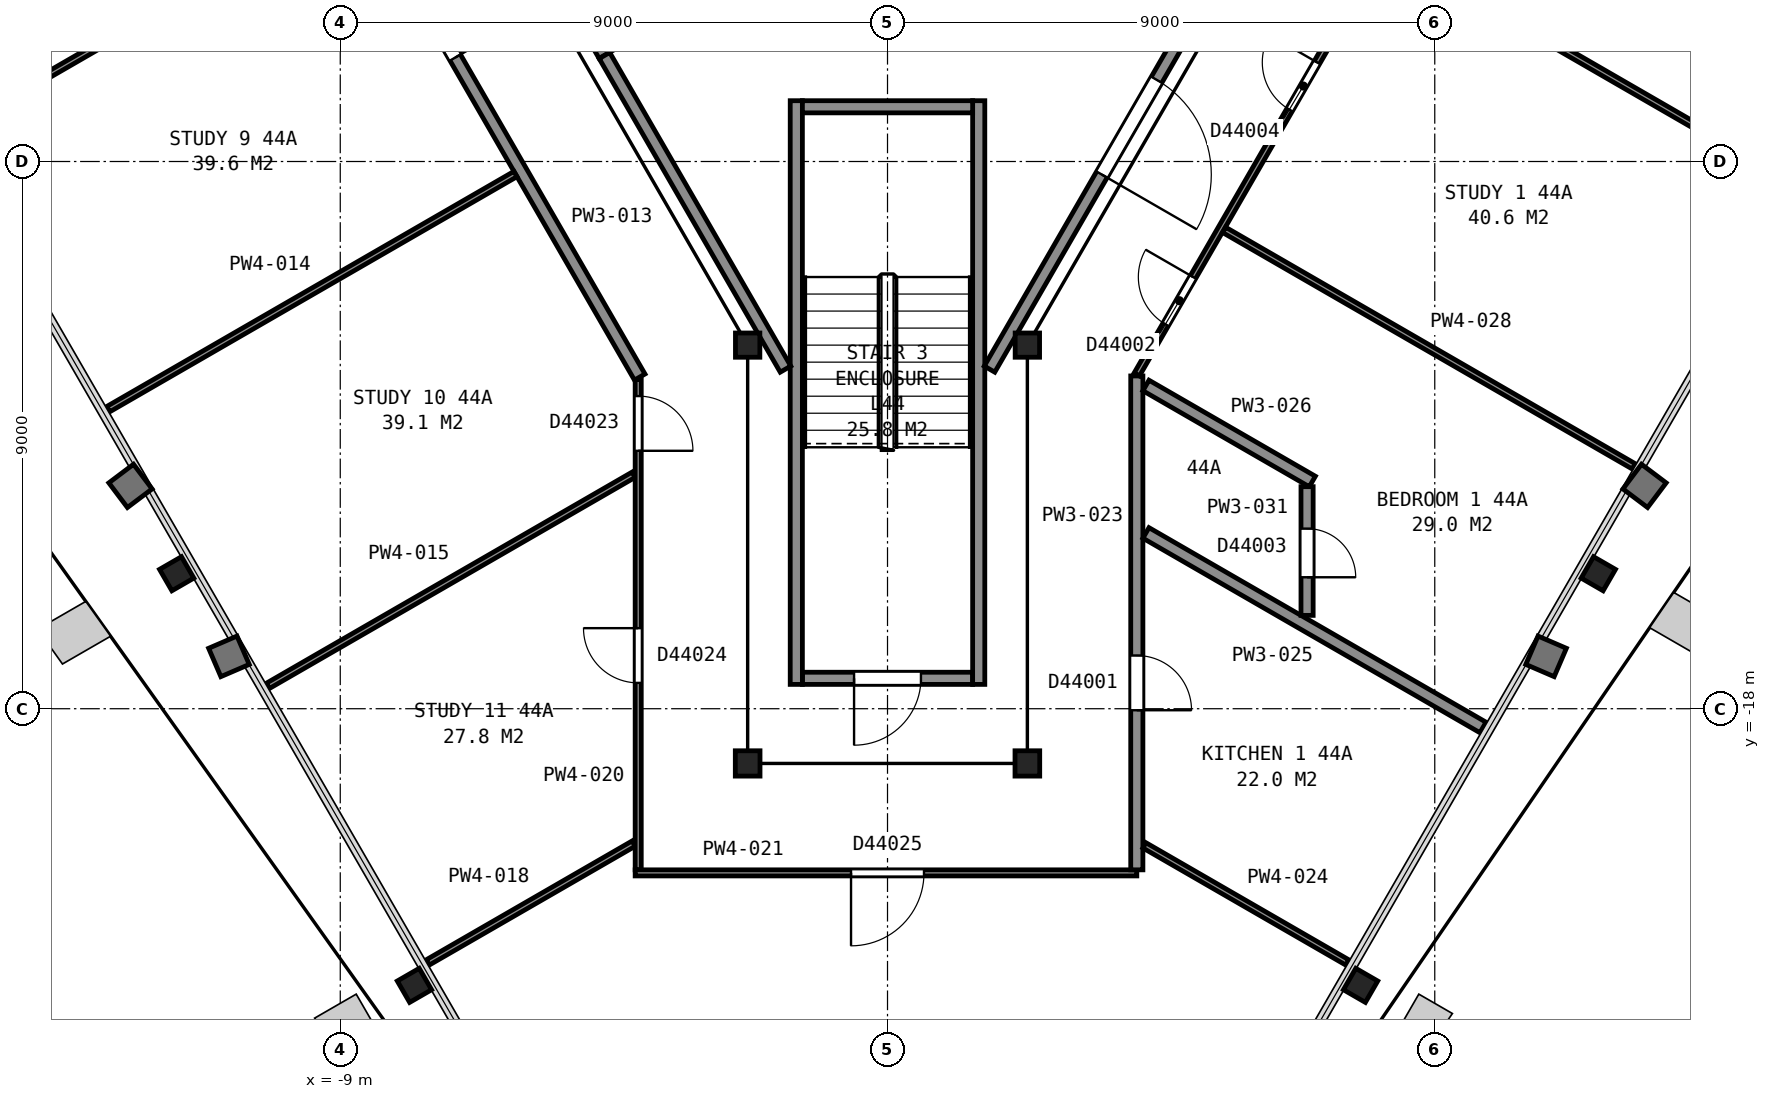
"""IFC4 building model, lengths in metres.
Left out: names, types, materials, properties, quantities, classifications, styles, units other than length and angle.
Written with IfcOpenShell. Run it as: python <this file> out.ifc"""

import sys

from ifc_helpers import new_model, si_unit, direction, frame, frame_2d, origin, origin_2d, place, context, subcontext, project, spatial, rectangle, i_section, extrude, element, fill, save


model = new_model("IFC4")
c1 = context("Model", 3, precision=1e-05, world=origin(), true_north=direction((0.0, 1.0)))
c2 = subcontext(c1, "Body", "Model", "MODEL_VIEW")
j1 = project(units=[si_unit("LENGTHUNIT", "METRE"), si_unit("PLANEANGLEUNIT", "RADIAN")], contexts=[c1])
p1 = place(None, origin())
s1 = spatial("IfcSite", under=j1, at=p1, CompositionType="ELEMENT")
p2 = place(p1, origin())
s2 = spatial("IfcBuilding", under=s1, at=p2, CompositionType="ELEMENT")
p3 = place(p2, frame((0.0, 0.0, 178.4)))
s3 = spatial("IfcBuildingStorey", under=s2, at=p3, CompositionType="ELEMENT", Elevation=178.4)
p4 = place(p3, frame((-11.69, -15.78, 0.035), z_axis=(0.0, 0.0, 1.0), x_axis=(-0.5, 0.866025403784, 0.0)))
e1 = element("IfcColumn", 1, at=p4, inside=s3, PredefinedType="COLUMN", context=c2, shape_type="SweptSolid", body=[
    extrude(i_section(OverallWidth=0.406, OverallDepth=0.417, WebThickness=0.03, FlangeThickness=0.048, FilletRadius=0.015, at=origin_2d()), origin(), (0.0, 0.0, 1.0), 3.665),
])
for number, where, z_axis, x_axis in (
    (2, (-7.78, -22.55, 0.04), (0.0, 0.0, 1.0), (-0.5, 0.866, 0.0)),
    (3, (7.78, -22.55, 0.04), (0.0, 0.0, 1.0), (-0.5, -0.866, 0.0)),
):
    element("IfcColumn", number, at=place(p3, frame(where, z_axis=z_axis, x_axis=x_axis)), inside=s3, PredefinedType="COLUMN", context=c2, shape_type="SweptSolid", body=[
        extrude(i_section(OverallWidth=0.406, OverallDepth=0.417, WebThickness=0.03, FlangeThickness=0.048, FilletRadius=0.015, at=origin_2d()), origin(), (0.0, 0.0, 1.0), 3.66),
    ])
p5 = place(p3, frame((11.69, -15.78, 0.035), z_axis=(0.0, 0.0, 1.0), x_axis=(-0.5, -0.866025403784, 0.0)))
e4 = element("IfcColumn", 4, at=p5, inside=s3, PredefinedType="COLUMN", context=c2, shape_type="SweptSolid", body=[
    extrude(i_section(OverallWidth=0.406, OverallDepth=0.417, WebThickness=0.03, FlangeThickness=0.048, FilletRadius=0.015, at=origin_2d()), origin(), (0.0, 0.0, 1.0), 3.665),
])
p6 = place(p3, frame((-2.3, -12.02, 0.0), z_axis=(0.0, 0.0, 1.0), x_axis=(1.0, 0.0, 0.0)))
e5 = element("IfcColumn", 5, at=p6, inside=s3, PredefinedType="COLUMN", context=c2, shape_type="SweptSolid", body=[
    extrude(i_section(OverallWidth=0.401, OverallDepth=0.399, WebThickness=0.025, FlangeThickness=0.04, FilletRadius=0.015, at=origin_2d()), origin(), (0.0, 0.0, 1.0), 3.7),
])
for number, where, z_axis, x_axis in (
    (6, (-2.3, -18.9, 0.0), (0.0, 0.0, 1.0), (-1.0, 0.0, 0.0)),
    (7, (2.3, -18.9, 0.0), (0.0, 0.0, 1.0), (-1.0, 0.0, 0.0)),
):
    element("IfcColumn", number, at=place(p3, frame(where, z_axis=z_axis, x_axis=x_axis)), inside=s3, PredefinedType="COLUMN", context=c2, shape_type="SweptSolid", body=[
        extrude(i_section(OverallWidth=0.406, OverallDepth=0.417, WebThickness=0.03, FlangeThickness=0.048, FilletRadius=0.015, at=origin_2d()), origin(), (0.0, 0.0, 1.0), 3.7),
    ])
p7 = place(p3, frame((2.3, -12.02, 0.0), z_axis=(0.0, 0.0, 1.0), x_axis=(1.0, 0.0, 0.0)))
e8 = element("IfcColumn", 8, at=p7, inside=s3, PredefinedType="COLUMN", context=c2, shape_type="SweptSolid", body=[
    extrude(i_section(OverallWidth=0.401, OverallDepth=0.399, WebThickness=0.025, FlangeThickness=0.04, FilletRadius=0.015, at=origin_2d()), origin(), (0.0, 0.0, 1.0), 3.7),
])
p8 = place(p3, frame((-1.4, -17.5, 0.0), z_axis=(0.0, 0.0, 1.0), x_axis=(1.0, 0.0, 0.0)))
e9 = element("IfcWall", 9, at=p8, inside=s3, PredefinedType="PARTITIONING", context=c2, shape_type="SweptSolid", body=[
    extrude(rectangle(XDim=2.8, YDim=0.2, at=frame_2d((1.4, 0.0))), origin(), (0.0, 0.0, 1.0), 3.45),
])
p9 = place(p8, frame((0.85, 0.0, 0.0)))
e10 = element("IfcOpeningElement", 10, at=p9, cuts=e9, PredefinedType="OPENING", context=c2, shape_type="SweptSolid", body=[
    extrude(rectangle(XDim=1.1, YDim=2.1, at=frame_2d((0.55, 1.05))), frame((0.0, 0.11, 0.0), z_axis=(0.0, -1.0, 0.0), x_axis=(1.0, 0.0, 0.0)), (0.0, 0.0, 1.0), 0.22),
])
for number, where, z_axis, x_axis in (
    (11, (1.5, -8.0, 0.0), (0.0, 0.0, 1.0), (0.0, -1.0, 0.0)),
    (12, (-1.5, -8.0, 0.0), (0.0, 0.0, 1.0), (0.0, -1.0, 0.0)),
):
    element("IfcWall", number, at=place(p3, frame(where, z_axis=z_axis, x_axis=x_axis)), inside=s3, PredefinedType="PARTITIONING", context=c2, shape_type="SweptSolid", body=[
        extrude(rectangle(XDim=9.6, YDim=0.2, at=frame_2d((4.8, 0.0))), origin(), (0.0, 0.0, 1.0), 3.45),
    ])
p10 = place(p3, frame((-1.4, -8.1, 0.0), z_axis=(0.0, 0.0, 1.0), x_axis=(1.0, 0.0, 0.0)))
e13 = element("IfcWall", 13, at=p10, inside=s3, PredefinedType="PARTITIONING", context=c2, shape_type="SweptSolid", body=[
    extrude(rectangle(XDim=2.8, YDim=0.2, at=frame_2d((1.4, 0.0))), origin(), (0.0, 0.0, 1.0), 3.45),
])
p11 = place(p3, frame((-4.62, -7.118, 0.0), z_axis=(0.0, 0.0, 1.0), x_axis=(0.866036909293, 0.499980071345, 0.0)))
e14 = element("IfcWall", 14, at=p11, inside=s3, PredefinedType="PARTITIONING", context=c2, shape_type="SweptSolid", body=[
    extrude(rectangle(XDim=1.75, YDim=0.2, at=frame_2d((0.875, 0.0))), origin(), (0.0, 0.0, 1.0), 3.7),
])
p12 = place(p3, frame((-4.656, -7.255, 0.0), z_axis=(0.0, 0.0, 1.0), x_axis=(-0.499990435942, 0.866030925526, 0.0)))
e15 = element("IfcWall", 15, at=p12, inside=s3, PredefinedType="PARTITIONING", context=c2, shape_type="SweptSolid", body=[
    extrude(rectangle(XDim=2.55, YDim=0.2, at=frame_2d((1.275, 0.0))), origin(), (0.0, 0.0, 1.0), 3.7),
])
p13 = place(p3, frame((-4.655, -7.257, 0.0), z_axis=(0.0, 0.0, 1.0), x_axis=(0.499966124405, -0.866044960985, 0.0)))
e16 = element("IfcWall", 16, at=p13, inside=s3, PredefinedType="PARTITIONING", context=c2, shape_type="SweptSolid", body=[
    extrude(rectangle(XDim=5.956, YDim=0.2, at=frame_2d((2.978, 0.0))), origin(), (0.0, 0.0, 1.0), 3.45),
])
p14 = place(p3, frame((1.677, -12.415, 0.0), z_axis=(0.0, 0.0, 1.0), x_axis=(0.500054337157, 0.865994029939, 0.0)))
e17 = element("IfcWall", 17, at=p14, inside=s3, PredefinedType="PARTITIONING", context=c2, shape_type="SweptSolid", body=[
    extrude(rectangle(XDim=6.177, YDim=0.2, at=frame_2d((3.088, 0.0))), origin(), (0.0, 0.0, 1.0), 3.45),
])
p15 = place(p14, frame((3.695, 0.0, 0.0)))
e18 = element("IfcOpeningElement", 18, at=p15, cuts=e17, PredefinedType="OPENING", context=c2, shape_type="SweptSolid", body=[
    extrude(rectangle(XDim=1.8, YDim=2.1, at=frame_2d((0.9, 1.05))), frame((0.0, 0.11, 0.0), z_axis=(0.0, -1.0, 0.0), x_axis=(1.0, 0.0, 0.0)), (0.0, 0.0, 1.0), 0.22),
])
p16 = place(p3, frame((-15.442, -8.523, 0.0), z_axis=(0.0, 0.0, 1.0), x_axis=(0.866007875589, 0.500030358497, 0.0)))
e19 = element("IfcWall", 19, at=p16, inside=s3, PredefinedType="PARTITIONING", context=c2, shape_type="SweptSolid", body=[
    extrude(rectangle(XDim=7.733, YDim=0.1, at=frame_2d((3.866, 0.0))), origin(), (0.0, 0.0, 1.0), 2.713),
])
p17 = place(p3, frame((-4.075, -12.545, 0.0), z_axis=(0.0, 0.0, 1.0), x_axis=(-0.499997769292, 0.86602669168, 0.0)))
e20 = element("IfcWall", 20, at=p17, inside=s3, PredefinedType="PARTITIONING", context=c2, shape_type="SweptSolid", body=[
    extrude(rectangle(XDim=17.706, YDim=0.2, at=frame_2d((8.853, 0.0))), origin(), (0.0, 0.0, 1.0), 2.713),
])
p18 = place(p17, frame((14.46, 0.0, 0.0)))
e21 = element("IfcOpeningElement", 21, at=p18, cuts=e20, PredefinedType="OPENING", context=c2, shape_type="SweptSolid", body=[
    extrude(rectangle(XDim=0.9, YDim=2.1, at=frame_2d((0.45, 1.05))), frame((0.0, 0.11, 0.0), z_axis=(0.0, -1.0, 0.0), x_axis=(1.0, 0.0, 0.0)), (0.0, 0.0, 1.0), 0.22),
])
p19 = place(p17, frame((10.896, 0.0, 0.0)))
e22 = element("IfcOpeningElement", 22, at=p19, cuts=e20, PredefinedType="OPENING", context=c2, shape_type="SweptSolid", body=[
    extrude(rectangle(XDim=0.9, YDim=2.1, at=frame_2d((0.45, 1.05))), frame((0.0, 0.11, 0.0), z_axis=(0.0, -1.0, 0.0), x_axis=(1.0, 0.0, 0.0)), (0.0, 0.0, 1.0), 0.22),
])
p20 = place(p17, frame((6.068, 0.0, 0.0)))
e23 = element("IfcOpeningElement", 23, at=p20, cuts=e20, PredefinedType="OPENING", context=c2, shape_type="SweptSolid", body=[
    extrude(rectangle(XDim=0.9, YDim=2.1, at=frame_2d((0.45, 1.05))), frame((0.0, 0.11, 0.0), z_axis=(0.0, -1.0, 0.0), x_axis=(1.0, 0.0, 0.0)), (0.0, 0.0, 1.0), 0.22),
])
p21 = place(p3, frame((-12.815, -13.073, 0.0), z_axis=(0.0, 0.0, 1.0), x_axis=(0.866007875589, 0.500030358497, 0.0)))
e24 = element("IfcWall", 24, at=p21, inside=s3, PredefinedType="PARTITIONING", context=c2, shape_type="SweptSolid", body=[
    extrude(rectangle(XDim=7.733, YDim=0.1, at=frame_2d((3.866, 0.0))), origin(), (0.0, 0.0, 1.0), 2.713),
])
p22 = place(p3, frame((-10.189, -17.623, 0.0), z_axis=(0.0, 0.0, 1.0), x_axis=(0.866045070519, 0.499965934669, 0.0)))
e25 = element("IfcWall", 25, at=p22, inside=s3, PredefinedType="PARTITIONING", context=c2, shape_type="SweptSolid", body=[
    extrude(rectangle(XDim=6.944, YDim=0.1, at=frame_2d((3.472, 0.0))), origin(), (0.0, 0.0, 1.0), 2.713),
])
p23 = place(p3, frame((-7.562, -22.173, 0.0), z_axis=(0.0, 0.0, 1.0), x_axis=(0.866079547155, 0.499906209203, 0.0)))
e26 = element("IfcWall", 26, at=p23, inside=s3, PredefinedType="PARTITIONING", context=c2, shape_type="SweptSolid", body=[
    extrude(rectangle(XDim=3.91, YDim=0.1, at=frame_2d((1.955, 0.0))), origin(), (0.0, 0.0, 1.0), 2.713),
])
p24 = place(p3, frame((-4.1, -20.65, 0.0), z_axis=(0.0, 0.0, 1.0), x_axis=(0.0, 1.0, 0.0)))
e27 = element("IfcWall", 27, at=p24, inside=s3, PredefinedType="PARTITIONING", context=c2, shape_type="SweptSolid", body=[
    extrude(rectangle(XDim=8.063, YDim=0.1, at=frame_2d((4.031, 0.0))), origin(), (0.0, 0.0, 1.0), 2.713),
])
p25 = place(p24, frame((6.892, 0.0, 0.0)))
e28 = element("IfcOpeningElement", 28, at=p25, cuts=e27, PredefinedType="OPENING", context=c2, shape_type="SweptSolid", body=[
    extrude(rectangle(XDim=0.9, YDim=2.1, at=frame_2d((0.45, 1.05))), frame((0.0, 0.06, 0.0), z_axis=(0.0, -1.0, 0.0), x_axis=(1.0, 0.0, 0.0)), (0.0, 0.0, 1.0), 0.12),
])
p26 = place(p24, frame((3.075, 0.0, 0.0)))
e29 = element("IfcOpeningElement", 29, at=p26, cuts=e27, PredefinedType="OPENING", context=c2, shape_type="SweptSolid", body=[
    extrude(rectangle(XDim=0.9, YDim=2.1, at=frame_2d((0.45, 1.05))), frame((0.0, 0.06, 0.0), z_axis=(0.0, -1.0, 0.0), x_axis=(1.0, 0.0, 0.0)), (0.0, 0.0, 1.0), 0.12),
])
p27 = place(p3, frame((4.1, -20.7, 0.0), z_axis=(0.0, 0.0, 1.0), x_axis=(-1.0, 0.0, 0.0)))
e30 = element("IfcWall", 30, at=p27, inside=s3, PredefinedType="PARTITIONING", context=c2, shape_type="SweptSolid", body=[
    extrude(rectangle(XDim=8.25, YDim=0.1, at=frame_2d((4.125, 0.0))), origin(), (0.0, 0.0, 1.0), 2.713),
])
p28 = place(p27, frame((3.5, 0.0, 0.0)))
e31 = element("IfcOpeningElement", 31, at=p28, cuts=e30, PredefinedType="OPENING", context=c2, shape_type="SweptSolid", body=[
    extrude(rectangle(XDim=1.2, YDim=2.1, at=frame_2d((0.6, 1.05))), frame((0.0, 0.06, 0.0), z_axis=(0.0, -1.0, 0.0), x_axis=(1.0, 0.0, 0.0)), (0.0, 0.0, 1.0), 0.12),
])
p29 = place(p3, frame((4.1, -12.527, 0.0), z_axis=(0.0, 0.0, 1.0), x_axis=(0.0, -1.0, 0.0)))
e32 = element("IfcWall", 32, at=p29, inside=s3, PredefinedType="PARTITIONING", context=c2, shape_type="SweptSolid", body=[
    extrude(rectangle(XDim=8.123, YDim=0.2, at=frame_2d((4.062, 0.0))), origin(), (0.0, 0.0, 1.0), 2.713),
])
p30 = place(p29, frame((4.598, 0.0, 0.0)))
e33 = element("IfcOpeningElement", 33, at=p30, cuts=e32, PredefinedType="OPENING", context=c2, shape_type="SweptSolid", body=[
    extrude(rectangle(XDim=0.9, YDim=2.1, at=frame_2d((0.45, 1.05))), frame((0.0, 0.11, 0.0), z_axis=(0.0, -1.0, 0.0), x_axis=(1.0, 0.0, 0.0)), (0.0, 0.0, 1.0), 0.22),
])
p31 = place(p3, frame((4.225, -20.247, 0.0), z_axis=(0.0, 0.0, 1.0), x_axis=(0.866070569679, -0.499921762215, 0.0)))
e34 = element("IfcWall", 34, at=p31, inside=s3, PredefinedType="PARTITIONING", context=c2, shape_type="SweptSolid", body=[
    extrude(rectangle(XDim=3.853, YDim=0.1, at=frame_2d((1.926, 0.0))), origin(), (0.0, 0.0, 1.0), 2.713),
])
p32 = place(p3, frame((4.25, -15.109, 0.0), z_axis=(0.0, 0.0, 1.0), x_axis=(0.866077604108, -0.499909575486, 0.0)))
e35 = element("IfcWall", 35, at=p32, inside=s3, PredefinedType="PARTITIONING", context=c2, shape_type="SweptSolid", body=[
    extrude(rectangle(XDim=6.4, YDim=0.2, at=frame_2d((3.2, 0.0))), origin(), (0.0, 0.0, 1.0), 2.713),
])
p33 = place(p3, frame((4.25, -12.684, 0.0), z_axis=(0.0, 0.0, 1.0), x_axis=(0.866109679077, -0.499854002494, 0.0)))
e36 = element("IfcWall", 36, at=p33, inside=s3, PredefinedType="PARTITIONING", context=c2, shape_type="SweptSolid", body=[
    extrude(rectangle(XDim=3.16, YDim=0.2, at=frame_2d((1.58, 0.0))), origin(), (0.0, 0.0, 1.0), 2.713),
])
p34 = place(p3, frame((12.903, 2.745, 0.0), z_axis=(0.0, 0.0, 1.0), x_axis=(-0.499997333799, -0.866026943111, 0.0)))
e37 = element("IfcWall", 37, at=p34, inside=s3, PredefinedType="PARTITIONING", context=c2, shape_type="SweptSolid", body=[
    extrude(rectangle(XDim=17.606, YDim=0.1, at=frame_2d((8.803, 0.0))), origin(), (0.0, 0.0, 1.0), 2.713),
])
p35 = place(p34, frame((15.756, 0.0, 0.0)))
e38 = element("IfcOpeningElement", 38, at=p35, cuts=e37, PredefinedType="OPENING", context=c2, shape_type="SweptSolid", body=[
    extrude(rectangle(XDim=0.9, YDim=2.1, at=frame_2d((0.45, 1.05))), frame((0.0, 0.06, 0.0), z_axis=(0.0, -1.0, 0.0), x_axis=(1.0, 0.0, 0.0)), (0.0, 0.0, 1.0), 0.12),
])
p36 = place(p34, frame((11.679, 0.0, 0.0)))
e39 = element("IfcOpeningElement", 39, at=p36, cuts=e37, PredefinedType="OPENING", context=c2, shape_type="SweptSolid", body=[
    extrude(rectangle(XDim=0.9, YDim=2.1, at=frame_2d((0.45, 1.05))), frame((0.0, 0.06, 0.0), z_axis=(0.0, -1.0, 0.0), x_axis=(1.0, 0.0, 0.0)), (0.0, 0.0, 1.0), 0.12),
])
p37 = place(p34, frame((6.324, 0.0, 0.0)))
e40 = element("IfcOpeningElement", 40, at=p37, cuts=e37, PredefinedType="OPENING", context=c2, shape_type="SweptSolid", body=[
    extrude(rectangle(XDim=0.9, YDim=2.1, at=frame_2d((0.45, 1.05))), frame((0.0, 0.06, 0.0), z_axis=(0.0, -1.0, 0.0), x_axis=(1.0, 0.0, 0.0)), (0.0, 0.0, 1.0), 0.12),
])
p38 = place(p3, frame((5.536, -10.125, 0.0), z_axis=(0.0, 0.0, 1.0), x_axis=(0.866044474677, -0.49996696679, 0.0)))
e41 = element("IfcWall", 41, at=p38, inside=s3, PredefinedType="PARTITIONING", context=c2, shape_type="SweptSolid", body=[
    extrude(rectangle(XDim=7.779, YDim=0.1, at=frame_2d((3.889, 0.0))), origin(), (0.0, 0.0, 1.0), 2.713),
])
p39 = place(p3, frame((6.9, -16.465, 0.0), z_axis=(0.0, 0.0, 1.0), x_axis=(0.0, 1.0, 0.0)))
e42 = element("IfcWall", 42, at=p39, inside=s3, PredefinedType="PARTITIONING", context=c2, shape_type="SweptSolid", body=[
    extrude(rectangle(XDim=2.117, YDim=0.2, at=frame_2d((1.059, 0.0))), origin(), (0.0, 0.0, 1.0), 2.713),
])
p40 = place(p39, frame((0.627, 0.0, 0.0)))
e43 = element("IfcOpeningElement", 43, at=p40, cuts=e42, PredefinedType="OPENING", context=c2, shape_type="SweptSolid", body=[
    extrude(rectangle(XDim=0.8, YDim=2.1, at=frame_2d((0.4, 1.05))), frame((0.0, 0.11, 0.0), z_axis=(0.0, -1.0, 0.0), x_axis=(1.0, 0.0, 0.0)), (0.0, 0.0, 1.0), 0.22),
])
p41 = place(p3, frame((8.214, -5.487, 0.0), z_axis=(0.0, 0.0, 1.0), x_axis=(0.866007344409, -0.500031278452, 0.0)))
e44 = element("IfcWall", 44, at=p41, inside=s3, PredefinedType="PARTITIONING", context=c2, shape_type="SweptSolid", body=[
    extrude(rectangle(XDim=7.778, YDim=0.1, at=frame_2d((3.889, 0.0))), origin(), (0.0, 0.0, 1.0), 2.713),
])
p42 = place(p9, origin())
e45 = element("IfcDoor", 45, at=p42, inside=s3, OperationType="SINGLE_SWING_LEFT", PredefinedType="DOOR", context=c2, shape_type="SweptSolid", body=[
    extrude(rectangle(XDim=1.1, YDim=2.1, at=frame_2d((0.55, 1.05))), frame((0.0, 0.025, 0.0), z_axis=(0.0, -1.0, 0.0), x_axis=(1.0, 0.0, 0.0)), (0.0, 0.0, 1.0), 0.05),
])
fill(e10, e45)
p43 = place(p15, origin())
e46 = element("IfcDoor", 46, at=p43, inside=s3, OperationType="DOUBLE_DOOR_SINGLE_SWING", PredefinedType="DOOR", context=c2, shape_type="SweptSolid", body=[
    extrude(rectangle(XDim=1.8, YDim=2.1, at=frame_2d((0.9, 1.05))), frame((0.0, 0.025, 0.0), z_axis=(0.0, -1.0, 0.0), x_axis=(1.0, 0.0, 0.0)), (0.0, 0.0, 1.0), 0.05),
])
fill(e18, e46)
p44 = place(p20, origin())
e47 = element("IfcDoor", 47, at=p44, inside=s3, OperationType="SINGLE_SWING_LEFT", PredefinedType="DOOR", context=c2, shape_type="SweptSolid", body=[
    extrude(rectangle(XDim=0.9, YDim=2.1, at=frame_2d((0.45, 1.05))), frame((0.0, 0.025, 0.0), z_axis=(0.0, -1.0, 0.0), x_axis=(1.0, 0.0, 0.0)), (0.0, 0.0, 1.0), 0.05),
])
fill(e23, e47)
p45 = place(p25, origin())
e48 = element("IfcDoor", 48, at=p45, inside=s3, OperationType="SINGLE_SWING_LEFT", PredefinedType="DOOR", context=c2, shape_type="SweptSolid", body=[
    extrude(rectangle(XDim=0.9, YDim=2.1, at=frame_2d((0.45, 1.05))), frame((0.0, 0.025, 0.0), z_axis=(0.0, -1.0, 0.0), x_axis=(1.0, 0.0, 0.0)), (0.0, 0.0, 1.0), 0.05),
])
fill(e28, e48)
p46 = place(p26, origin())
e49 = element("IfcDoor", 49, at=p46, inside=s3, OperationType="SINGLE_SWING_RIGHT", PredefinedType="DOOR", context=c2, shape_type="SweptSolid", body=[
    extrude(rectangle(XDim=0.9, YDim=2.1, at=frame_2d((0.45, 1.05))), frame((0.0, 0.025, 0.0), z_axis=(0.0, -1.0, 0.0), x_axis=(1.0, 0.0, 0.0)), (0.0, 0.0, 1.0), 0.05),
])
fill(e29, e49)
p47 = place(p28, origin())
e50 = element("IfcDoor", 50, at=p47, inside=s3, OperationType="SINGLE_SWING_RIGHT", PredefinedType="DOOR", context=c2, shape_type="SweptSolid", body=[
    extrude(rectangle(XDim=1.2, YDim=2.1, at=frame_2d((0.6, 1.05))), frame((0.0, 0.025, 0.0), z_axis=(0.0, -1.0, 0.0), x_axis=(1.0, 0.0, 0.0)), (0.0, 0.0, 1.0), 0.05),
])
fill(e31, e50)
p48 = place(p30, origin())
e51 = element("IfcDoor", 51, at=p48, inside=s3, OperationType="SINGLE_SWING_RIGHT", PredefinedType="DOOR", context=c2, shape_type="SweptSolid", body=[
    extrude(rectangle(XDim=0.9, YDim=2.1, at=frame_2d((0.45, 1.05))), frame((0.0, 0.025, 0.0), z_axis=(0.0, -1.0, 0.0), x_axis=(1.0, 0.0, 0.0)), (0.0, 0.0, 1.0), 0.05),
])
fill(e33, e51)
p49 = place(p35, origin())
e52 = element("IfcDoor", 52, at=p49, inside=s3, OperationType="SINGLE_SWING_LEFT", PredefinedType="DOOR", context=c2, shape_type="SweptSolid", body=[
    extrude(rectangle(XDim=0.9, YDim=2.1, at=frame_2d((0.45, 1.05))), frame((0.0, 0.025, 0.0), z_axis=(0.0, -1.0, 0.0), x_axis=(1.0, 0.0, 0.0)), (0.0, 0.0, 1.0), 0.05),
])
fill(e38, e52)
p50 = place(p36, origin())
e53 = element("IfcDoor", 53, at=p50, inside=s3, OperationType="SINGLE_SWING_LEFT", PredefinedType="DOOR", context=c2, shape_type="SweptSolid", body=[
    extrude(rectangle(XDim=0.9, YDim=2.1, at=frame_2d((0.45, 1.05))), frame((0.0, 0.025, 0.0), z_axis=(0.0, -1.0, 0.0), x_axis=(1.0, 0.0, 0.0)), (0.0, 0.0, 1.0), 0.05),
])
fill(e39, e53)
p51 = place(p40, origin())
e54 = element("IfcDoor", 54, at=p51, inside=s3, OperationType="SINGLE_SWING_LEFT", PredefinedType="DOOR", context=c2, shape_type="SweptSolid", body=[
    extrude(rectangle(XDim=0.8, YDim=2.1, at=frame_2d((0.4, 1.05))), frame((0.0, 0.025, 0.0), z_axis=(0.0, -1.0, 0.0), x_axis=(1.0, 0.0, 0.0)), (0.0, 0.0, 1.0), 0.05),
])
fill(e43, e54)
save(model, sys.argv[1])
